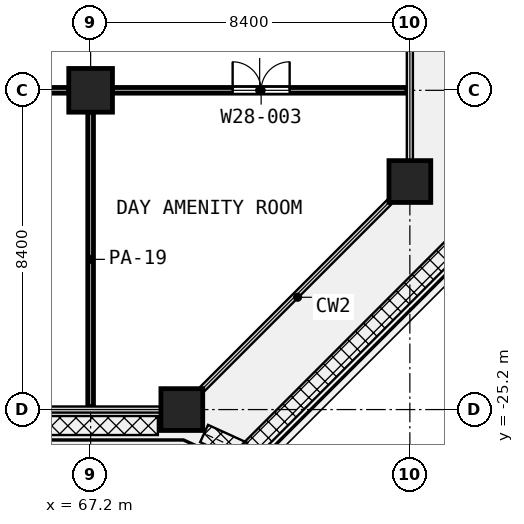
"""IFC4 building model, lengths in metres.
Left out: names, types, materials, properties, quantities, classifications, styles, units other than length and angle.
Written with IfcOpenShell. Run it as: python <this file> out.ifc"""

import sys

from ifc_helpers import new_model, si_unit, direction, frame, frame_2d, origin, origin_2d, place, context, subcontext, project, spatial, rectangle, extrude, element, fill, save


model = new_model("IFC4")
c1 = context("Model", 3, precision=1e-05, world=origin(), true_north=direction((0.0, 1.0)))
c2 = subcontext(c1, "Body", "Model", "MODEL_VIEW")
j1 = project(units=[si_unit("LENGTHUNIT", "METRE"), si_unit("PLANEANGLEUNIT", "RADIAN")], contexts=[c1])
p1 = place(None, origin())
s1 = spatial("IfcSite", under=j1, at=p1, CompositionType="ELEMENT")
p2 = place(p1, origin())
s2 = spatial("IfcBuilding", under=s1, at=p2, CompositionType="ELEMENT")
p3 = place(p2, frame((0.0, 0.0, 124.0)))
s3 = spatial("IfcBuildingStorey", under=s2, at=p3, CompositionType="ELEMENT", Elevation=124.0)
p4 = place(p3, frame((67.2, -16.8, 0.0), z_axis=(0.0, 0.0, 1.0), x_axis=(1.0, 0.0, 0.0)))
e1 = element("IfcColumn", 1, at=p4, inside=s3, PredefinedType="COLUMN", context=c2, shape_type="SweptSolid", body=[
    extrude(rectangle(XDim=1.15, YDim=1.15, at=origin_2d()), origin(), (0.0, 0.0, 1.0), 4.2),
])
for number, where, z_axis, x_axis in (
    (2, (75.6, -19.2, 0.0), (0.0, 0.0, 1.0), (1.0, 0.0, 0.0)),
    (3, (69.6, -25.2, 0.0), (0.0, 0.0, 1.0), (1.0, 0.0, 0.0)),
):
    element("IfcColumn", number, at=place(p3, frame(where, z_axis=z_axis, x_axis=x_axis)), inside=s3, PredefinedType="COLUMN", context=c2, shape_type="SweptSolid", body=[
        extrude(rectangle(XDim=1.1, YDim=1.1, at=origin_2d()), origin(), (0.0, 0.0, 1.0), 4.2),
    ])
p5 = place(p3, frame((25.0, -16.8, 0.0), z_axis=(0.0, 0.0, 1.0), x_axis=(1.0, 0.0, 0.0)))
e4 = element("IfcWall", 4, at=p5, inside=s3, PredefinedType="PARTITIONING", context=c2, shape_type="SweptSolid", body=[
    extrude(rectangle(XDim=41.625, YDim=0.15, at=frame_2d((20.812, 0.0))), origin(), (0.0, 0.0, 1.0), 3.6),
])
p6 = place(p5, frame((1.55, 0.0, 0.0)))
e5 = element("IfcOpeningElement", 5, at=p6, cuts=e4, PredefinedType="OPENING", context=c2, shape_type="SweptSolid", body=[
    extrude(rectangle(XDim=1.5, YDim=2.1, at=frame_2d((0.75, 1.05))), frame((0.0, 0.085, 0.0), z_axis=(0.0, -1.0, 0.0), x_axis=(1.0, 0.0, 0.0)), (0.0, 0.0, 1.0), 0.17),
])
p7 = place(p5, frame((9.2, 0.0, 0.0)))
e6 = element("IfcOpeningElement", 6, at=p7, cuts=e4, PredefinedType="OPENING", context=c2, shape_type="SweptSolid", body=[
    extrude(rectangle(XDim=1.0, YDim=2.1, at=frame_2d((0.5, 1.05))), frame((0.0, 0.085, 0.0), z_axis=(0.0, -1.0, 0.0), x_axis=(1.0, 0.0, 0.0)), (0.0, 0.0, 1.0), 0.17),
])
p8 = place(p5, frame((14.6, 0.0, 0.0)))
e7 = element("IfcOpeningElement", 7, at=p8, cuts=e4, PredefinedType="OPENING", context=c2, shape_type="SweptSolid", body=[
    extrude(rectangle(XDim=1.2, YDim=2.1, at=frame_2d((0.6, 1.05))), frame((0.0, 0.085, 0.0), z_axis=(0.0, -1.0, 0.0), x_axis=(1.0, 0.0, 0.0)), (0.0, 0.0, 1.0), 0.17),
])
p9 = place(p5, frame((17.7, 0.0, 0.0)))
e8 = element("IfcOpeningElement", 8, at=p9, cuts=e4, PredefinedType="OPENING", context=c2, shape_type="SweptSolid", body=[
    extrude(rectangle(XDim=0.9, YDim=2.1, at=frame_2d((0.45, 1.05))), frame((0.0, 0.085, 0.0), z_axis=(0.0, -1.0, 0.0), x_axis=(1.0, 0.0, 0.0)), (0.0, 0.0, 1.0), 0.17),
])
p10 = place(p5, frame((23.6, 0.0, 0.0)))
e9 = element("IfcOpeningElement", 9, at=p10, cuts=e4, PredefinedType="OPENING", context=c2, shape_type="SweptSolid", body=[
    extrude(rectangle(XDim=1.2, YDim=2.1, at=frame_2d((0.6, 1.05))), frame((0.0, 0.085, 0.0), z_axis=(0.0, -1.0, 0.0), x_axis=(1.0, 0.0, 0.0)), (0.0, 0.0, 1.0), 0.17),
])
p11 = place(p5, frame((26.4, 0.0, 0.0)))
e10 = element("IfcOpeningElement", 10, at=p11, cuts=e4, PredefinedType="OPENING", context=c2, shape_type="SweptSolid", body=[
    extrude(rectangle(XDim=1.2, YDim=2.1, at=frame_2d((0.6, 1.05))), frame((0.0, 0.085, 0.0), z_axis=(0.0, -1.0, 0.0), x_axis=(1.0, 0.0, 0.0)), (0.0, 0.0, 1.0), 0.17),
])
p12 = place(p5, frame((35.0, 0.0, 0.0)))
e11 = element("IfcOpeningElement", 11, at=p12, cuts=e4, PredefinedType="OPENING", context=c2, shape_type="SweptSolid", body=[
    extrude(rectangle(XDim=1.2, YDim=2.1, at=frame_2d((0.6, 1.05))), frame((0.0, 0.085, 0.0), z_axis=(0.0, -1.0, 0.0), x_axis=(1.0, 0.0, 0.0)), (0.0, 0.0, 1.0), 0.17),
])
p13 = place(p5, frame((32.25, 0.0, 0.0)))
e12 = element("IfcOpeningElement", 12, at=p13, cuts=e4, PredefinedType="OPENING", context=c2, shape_type="SweptSolid", body=[
    extrude(rectangle(XDim=0.9, YDim=2.1, at=frame_2d((0.45, 1.05))), frame((0.0, 0.085, 0.0), z_axis=(0.0, -1.0, 0.0), x_axis=(1.0, 0.0, 0.0)), (0.0, 0.0, 1.0), 0.17),
])
p14 = place(p5, frame((39.062, 0.0, 0.0)))
e13 = element("IfcOpeningElement", 13, at=p14, cuts=e4, PredefinedType="OPENING", context=c2, shape_type="SweptSolid", body=[
    extrude(rectangle(XDim=0.9, YDim=2.1, at=frame_2d((0.45, 1.05))), frame((0.0, 0.085, 0.0), z_axis=(0.0, -1.0, 0.0), x_axis=(1.0, 0.0, 0.0)), (0.0, 0.0, 1.0), 0.17),
])
p15 = place(p3, frame((67.775, -16.8, 0.0), z_axis=(0.0, 0.0, 1.0), x_axis=(1.0, 0.0, 0.0)))
e14 = element("IfcWall", 14, at=p15, inside=s3, PredefinedType="PARTITIONING", context=c2, shape_type="SweptSolid", body=[
    extrude(rectangle(XDim=7.745, YDim=0.15, at=frame_2d((3.873, 0.0))), origin(), (0.0, 0.0, 1.0), 3.6),
])
p16 = place(p15, frame((3.162, 0.0, 0.0)))
e15 = element("IfcOpeningElement", 15, at=p16, cuts=e14, PredefinedType="OPENING", context=c2, shape_type="SweptSolid", body=[
    extrude(rectangle(XDim=1.5, YDim=2.1, at=frame_2d((0.75, 1.05))), frame((0.0, 0.085, 0.0), z_axis=(0.0, -1.0, 0.0), x_axis=(1.0, 0.0, 0.0)), (0.0, 0.0, 1.0), 0.17),
])
p17 = place(p3, frame((67.2, -25.12, 0.0), z_axis=(0.0, 0.0, 1.0), x_axis=(0.0, 1.0, 0.0)))
e16 = element("IfcWall", 16, at=p17, inside=s3, PredefinedType="PARTITIONING", context=c2, shape_type="SweptSolid", body=[
    extrude(rectangle(XDim=7.745, YDim=0.15, at=frame_2d((3.873, 0.0))), origin(), (0.0, 0.0, 1.0), 2.7),
])
p18 = place(p16, origin())
e17 = element("IfcDoor", 17, at=p18, inside=s3, OperationType="DOUBLE_DOOR_SINGLE_SWING", PredefinedType="DOOR", context=c2, shape_type="SweptSolid", body=[
    extrude(rectangle(XDim=1.5, YDim=2.1, at=frame_2d((0.75, 1.05))), frame((0.0, 0.025, 0.0), z_axis=(0.0, -1.0, 0.0), x_axis=(1.0, 0.0, 0.0)), (0.0, 0.0, 1.0), 0.05),
])
fill(e15, e17)
save(model, sys.argv[1])
